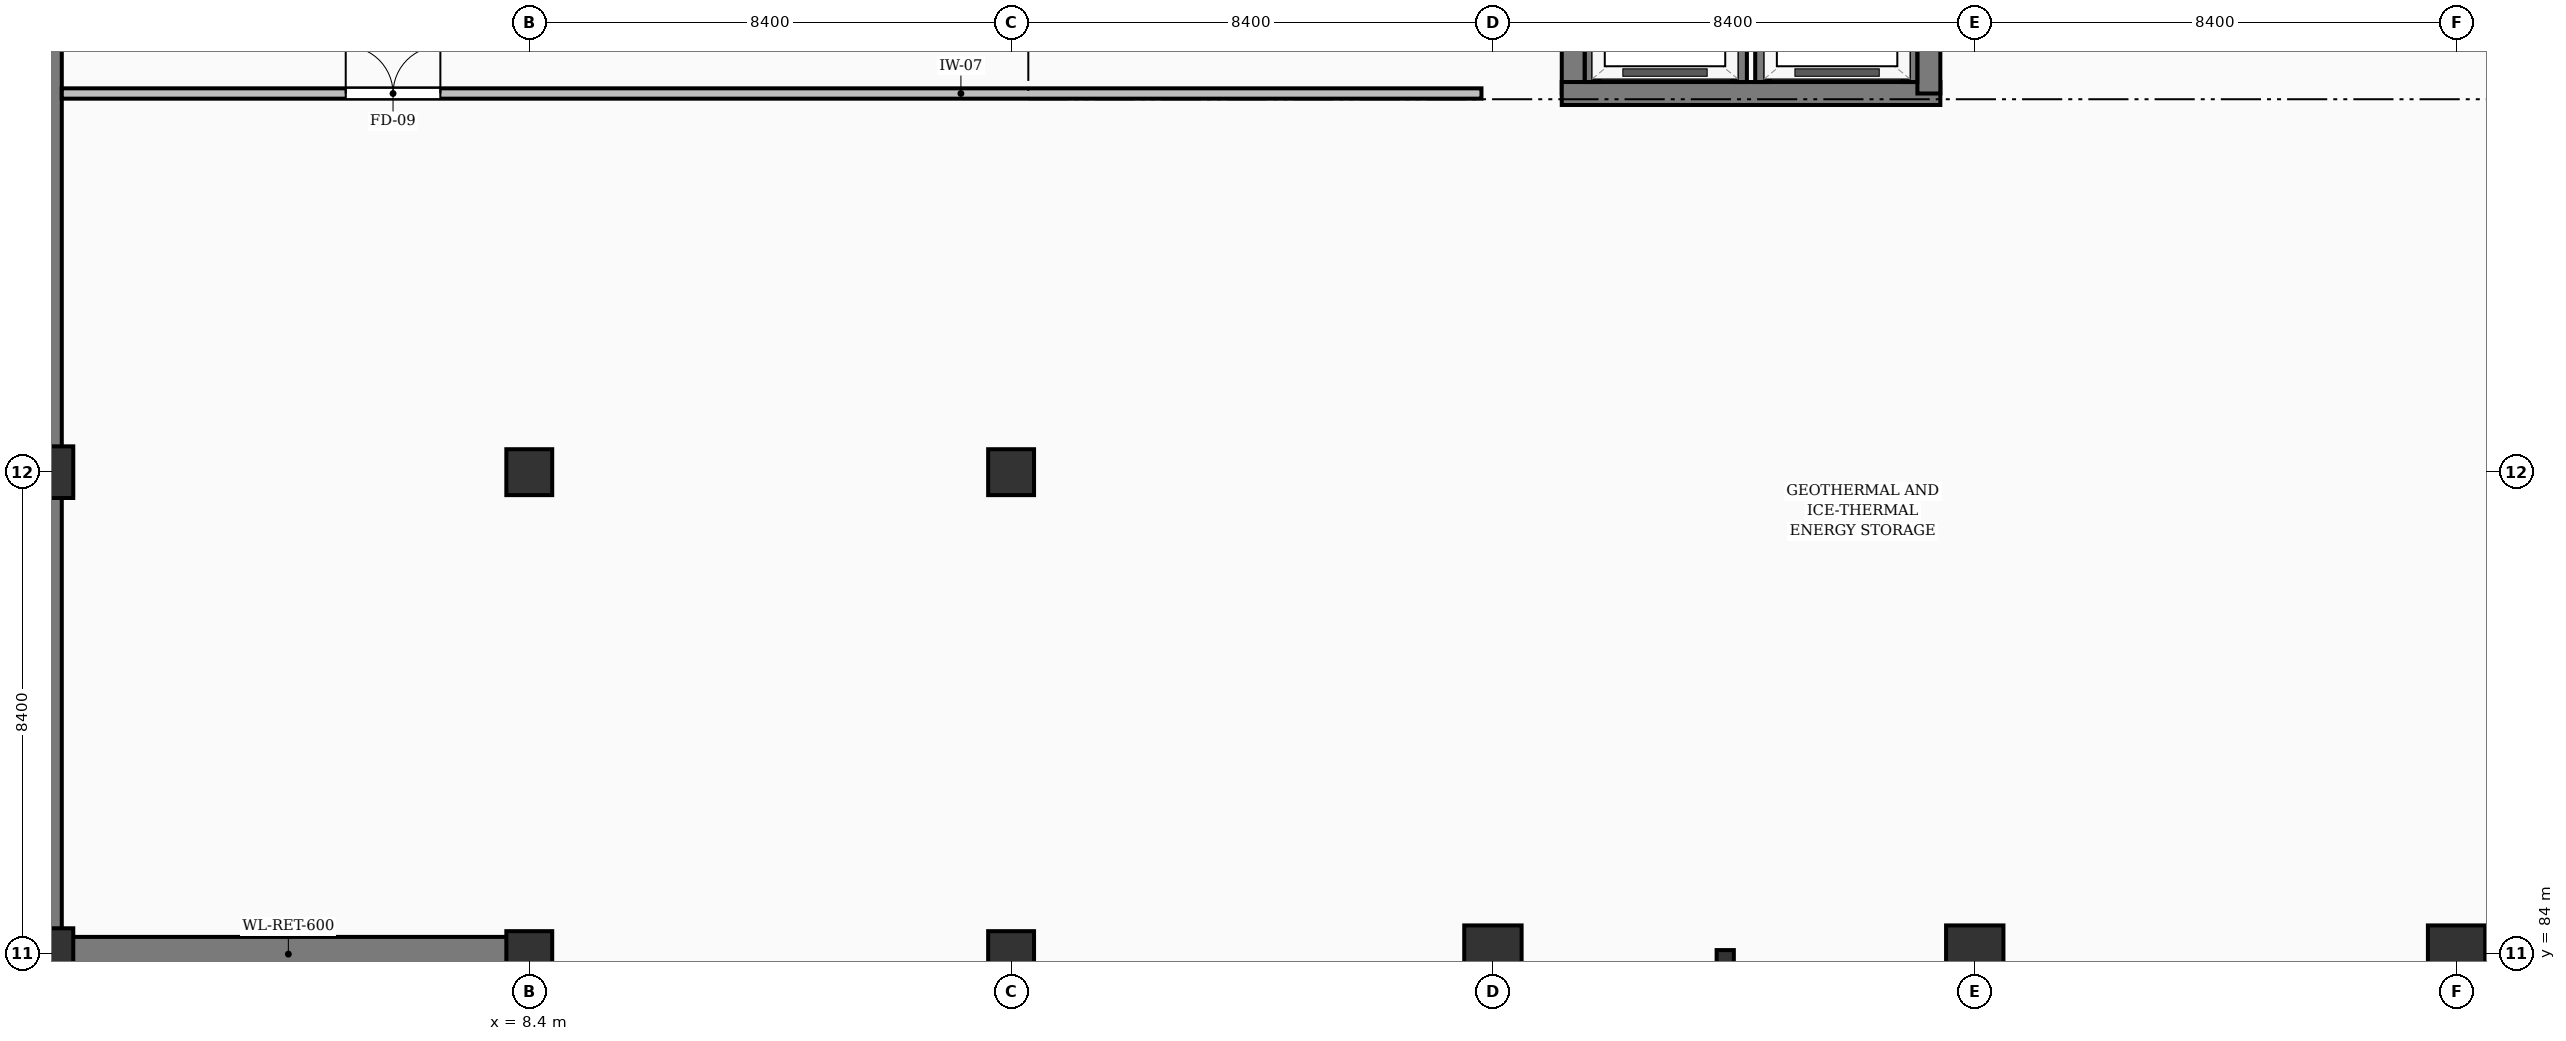
"""IFC4 building model, lengths in metres.
Left out: names, types, materials, properties, quantities, classifications, styles, units other than length and angle.
Written with IfcOpenShell. Run it as: python <this file> out.ifc"""

import sys

from ifc_helpers import new_model, si_unit, direction, frame, frame_2d, origin, origin_2d, place, context, subcontext, project, spatial, rectangle, hollow_rectangle, extrude, element, fill, save


model = new_model("IFC4")
c1 = context("Model", 3, precision=1e-05, world=origin(), true_north=direction((0.0, 1.0)))
c2 = subcontext(c1, "Body", "Model", "MODEL_VIEW")
j1 = project(units=[si_unit("LENGTHUNIT", "METRE"), si_unit("PLANEANGLEUNIT", "RADIAN")], contexts=[c1])
p1 = place(None, origin())
s1 = spatial("IfcSite", under=j1, at=p1, CompositionType="ELEMENT")
p2 = place(p1, origin())
s2 = spatial("IfcBuilding", under=s1, at=p2, CompositionType="ELEMENT")
p3 = place(p2, frame((0.0, 0.0, -7.56)))
s3 = spatial("IfcBuildingStorey", under=s2, at=p3, CompositionType="ELEMENT", Elevation=-7.56)
p4 = place(p3, frame((0.0, 117.6, -0.5), z_axis=(0.0, 0.0, 1.0), x_axis=(0.0, -1.0, 0.0)))
e1 = element("IfcWall", 1, at=p4, inside=s3, PredefinedType="USERDEFINED", context=c2, shape_type="SweptSolid", body=[
    extrude(rectangle(XDim=33.6, YDim=0.5, at=frame_2d((16.8, 0.0))), origin(), (0.0, 0.0, 1.0), 3.46),
])
p5 = place(p3, frame((0.0, 84.0, -0.5), z_axis=(0.0, 0.0, 1.0), x_axis=(1.0, 0.0, 0.0)))
e2 = element("IfcWall", 2, at=p5, inside=s3, PredefinedType="USERDEFINED", context=c2, shape_type="SweptSolid", body=[
    extrude(rectangle(XDim=8.4, YDim=0.6, at=frame_2d((4.2, 0.0))), origin(), (0.0, 0.0, 1.0), 3.46),
])
p6 = place(p3, frame((8.4, 84.0, -0.5), z_axis=(0.0, 0.0, 1.0), x_axis=(0.0, -1.0, 0.0)))
e3 = element("IfcWall", 3, at=p6, inside=s3, PredefinedType="USERDEFINED", context=c2, shape_type="SweptSolid", body=[
    extrude(rectangle(XDim=75.6, YDim=0.5, at=frame_2d((37.8, 0.0))), origin(), (0.0, 0.0, 1.0), 3.46),
])
for number, where, z_axis, x_axis in (
    (4, (0.0, 84.0, -0.5), (0.0, 0.0, 1.0), (1.0, 0.0, 0.0)),
    (5, (0.0, 92.4, -0.5), (0.0, 0.0, 1.0), (1.0, 0.0, 0.0)),
):
    element("IfcColumn", number, at=place(p3, frame(where, z_axis=z_axis, x_axis=x_axis)), inside=s3, PredefinedType="COLUMN", context=c2, shape_type="SweptSolid", body=[
        extrude(rectangle(XDim=0.9, YDim=0.9, at=origin_2d()), origin(), (0.0, 0.0, 1.0), 3.86),
    ])
for number, where, z_axis, x_axis in (
    (6, (8.4, 84.0, -0.5), (0.0, 0.0, 1.0), (1.0, 0.0, 0.0)),
    (7, (8.4, 92.4, -0.5), (0.0, 0.0, 1.0), (1.0, 0.0, 0.0)),
    (8, (16.8, 84.0, -0.5), (0.0, 0.0, 1.0), (1.0, 0.0, 0.0)),
    (9, (16.8, 92.4, -0.5), (0.0, 0.0, 1.0), (1.0, 0.0, 0.0)),
):
    element("IfcColumn", number, at=place(p3, frame(where, z_axis=z_axis, x_axis=x_axis)), inside=s3, PredefinedType="COLUMN", context=c2, shape_type="SweptSolid", body=[
        extrude(rectangle(XDim=0.8, YDim=0.8, at=origin_2d()), origin(), (0.0, 0.0, 1.0), 3.86),
    ])
for number, where, z_axis, x_axis in (
    (10, (25.2, 84.0, -0.5), (0.0, 0.0, 1.0), (1.0, 0.0, 0.0)),
    (11, (33.6, 84.0, -0.5), (0.0, 0.0, 1.0), (1.0, 0.0, 0.0)),
    (12, (42.0, 84.0, -0.5), (0.0, 0.0, 1.0), (1.0, 0.0, 0.0)),
):
    element("IfcColumn", number, at=place(p3, frame(where, z_axis=z_axis, x_axis=x_axis)), inside=s3, PredefinedType="COLUMN", context=c2, shape_type="SweptSolid", body=[
        extrude(rectangle(XDim=1.0, YDim=1.0, at=origin_2d()), origin(), (0.0, 0.0, 1.0), 3.86),
    ])
p7 = place(p3, frame((26.6, 99.0, -0.5), z_axis=(0.0, 0.0, 1.0), x_axis=(0.0, 1.0, 0.0)))
e13 = element("IfcWall", 13, at=p7, inside=s3, PredefinedType="SHEAR", context=c2, shape_type="SweptSolid", body=[
    extrude(rectangle(XDim=6.15, YDim=0.4, at=frame_2d((3.075, 0.0))), origin(), (0.0, 0.0, 1.0), 3.46),
])
p8 = place(p3, frame((26.4, 99.0, -0.5), z_axis=(0.0, 0.0, 1.0), x_axis=(1.0, 0.0, 0.0)))
e14 = element("IfcWall", 14, at=p8, inside=s3, PredefinedType="SHEAR", context=c2, shape_type="SweptSolid", body=[
    extrude(rectangle(XDim=6.6, YDim=0.4, at=frame_2d((3.3, 0.0))), origin(), (0.0, 0.0, 1.0), 3.46),
])
p9 = place(p3, frame((32.8, 99.0, -0.5), z_axis=(0.0, 0.0, 1.0), x_axis=(0.0, 1.0, 0.0)))
e15 = element("IfcWall", 15, at=p9, inside=s3, PredefinedType="SHEAR", context=c2, shape_type="SweptSolid", body=[
    extrude(rectangle(XDim=6.15, YDim=0.4, at=frame_2d((3.075, 0.0))), origin(), (0.0, 0.0, 1.0), 3.46),
])
p10 = place(p3, frame((29.25, 83.92, -0.5), z_axis=(0.0, 0.0, 1.0), x_axis=(1.0, 0.0, 0.0)))
e16 = element("IfcColumn", 16, at=p10, inside=s3, PredefinedType="COLUMN", context=c2, shape_type="SweptSolid", body=[
    extrude(hollow_rectangle(XDim=0.3, YDim=0.3, WallThickness=0.016, at=origin_2d()), origin(), (0.0, 0.0, 1.0), 3.86),
])
for number, where, z_axis, x_axis in (
    (17, (26.93, 99.2, -0.5), (0.0, 0.0, 1.0), (0.0, 1.0, 0.0)),
    (18, (29.5, 99.2, -0.5), (0.0, 0.0, 1.0), (0.0, 1.0, 0.0)),
    (19, (29.9, 99.2, -0.5), (0.0, 0.0, 1.0), (0.0, 1.0, 0.0)),
    (20, (32.47, 99.2, -0.5), (0.0, 0.0, 1.0), (0.0, 1.0, 0.0)),
):
    element("IfcWall", number, at=place(p3, frame(where, z_axis=z_axis, x_axis=x_axis)), inside=s3, PredefinedType="SOLIDWALL", context=c2, shape_type="SweptSolid", body=[
        extrude(rectangle(XDim=2.2, YDim=0.255, at=frame_2d((1.1, 0.0))), origin(), (0.0, 0.0, 1.0), 3.46),
    ])
p11 = place(p3, frame((0.25, 99.0, 0.0), z_axis=(0.0, 0.0, 1.0), x_axis=(1.0, 0.0, 0.0)))
e21 = element("IfcWall", 21, at=p11, inside=s3, PredefinedType="PARTITIONING", context=c2, shape_type="SweptSolid", body=[
    extrude(rectangle(XDim=24.75, YDim=0.18, at=frame_2d((12.375, 0.0))), origin(), (0.0, 0.0, 1.0), 2.96),
])
p12 = place(p11, frame((4.95, 0.0, 0.0)))
e22 = element("IfcOpeningElement", 22, at=p12, cuts=e21, PredefinedType="OPENING", context=c2, shape_type="SweptSolid", body=[
    extrude(rectangle(XDim=1.65, YDim=2.25, at=frame_2d((0.825, 1.125))), frame((0.0, 0.1, 0.0), z_axis=(0.0, -1.0, 0.0), x_axis=(1.0, 0.0, 0.0)), (0.0, 0.0, 1.0), 0.2),
])
p13 = place(p12, origin())
e23 = element("IfcDoor", 23, at=p13, inside=s3, OperationType="DOUBLE_DOOR_SINGLE_SWING", PredefinedType="DOOR", context=c2, shape_type="SweptSolid", body=[
    extrude(rectangle(XDim=1.65, YDim=2.25, at=frame_2d((0.825, 1.125))), frame((0.0, 0.025, 0.0), z_axis=(0.0, -1.0, 0.0), x_axis=(1.0, 0.0, 0.0)), (0.0, 0.0, 1.0), 0.05),
])
fill(e22, e23)
save(model, sys.argv[1])
